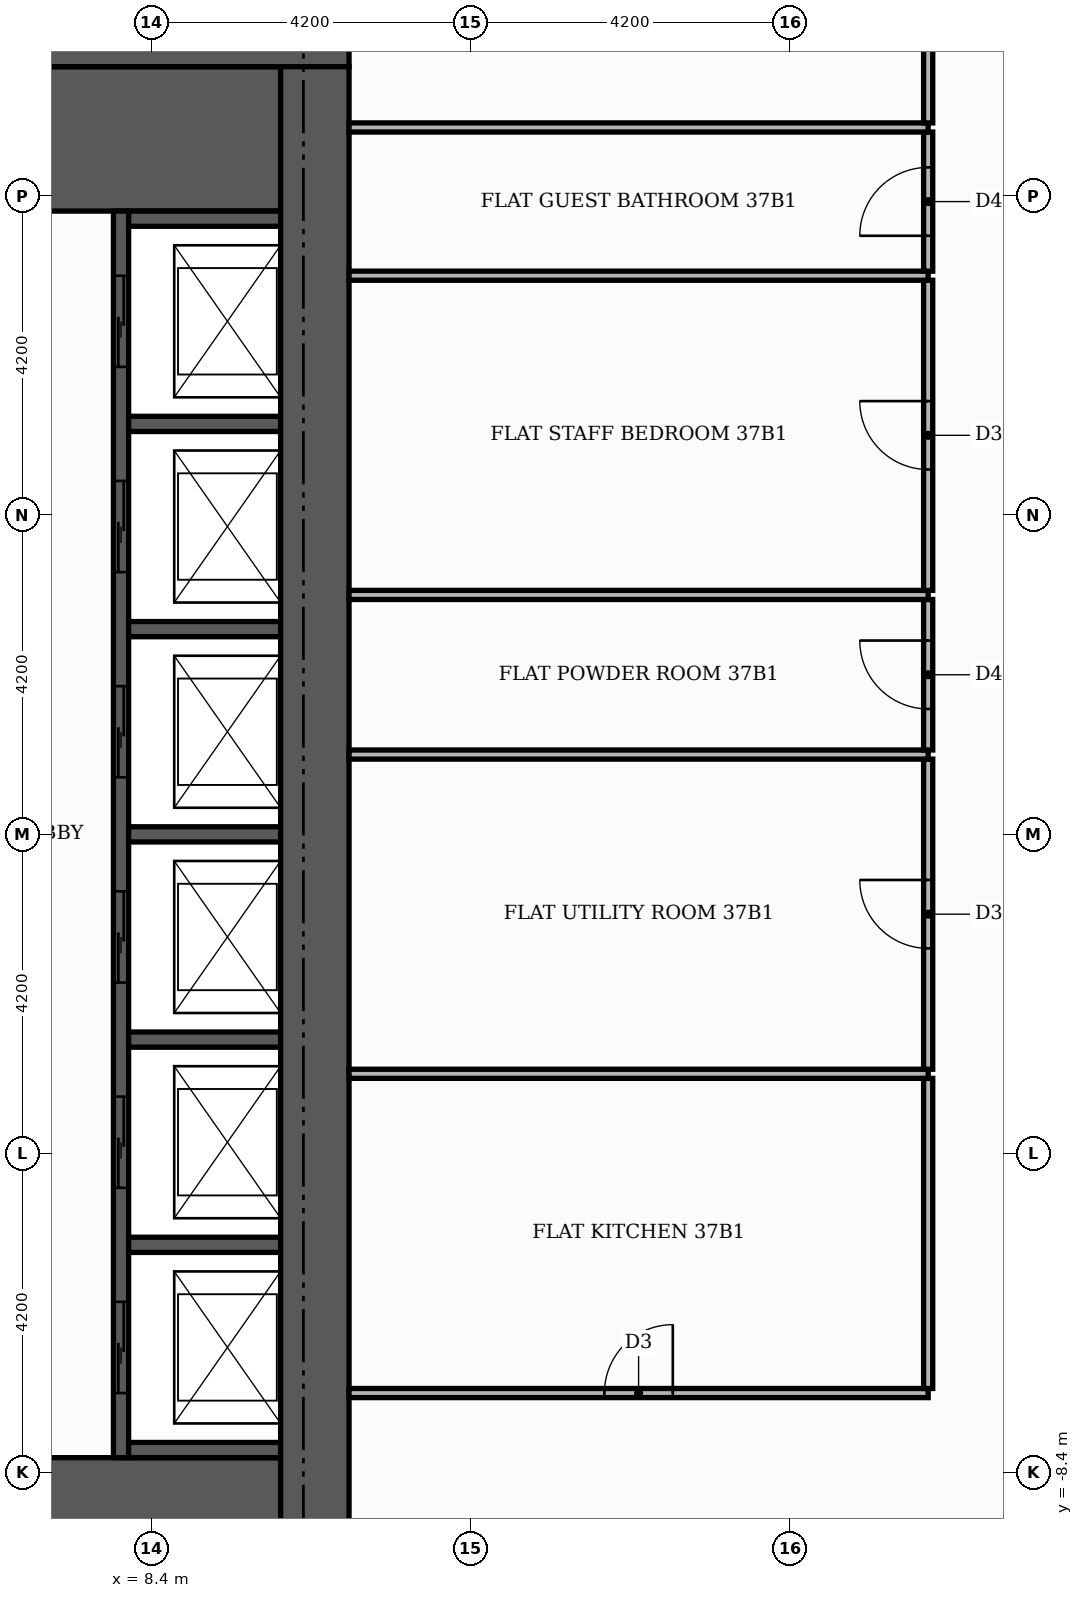
"""IFC4 building model, lengths in metres.
Left out: names, types, materials, properties, quantities, classifications, styles, units other than length and angle.
Written with IfcOpenShell. Run it as: python <this file> out.ifc"""

import sys

from ifc_helpers import new_model, si_unit, direction, frame, frame_2d, origin, place, context, subcontext, project, spatial, rectangle, extrude, element, fill, save


model = new_model("IFC4")
c1 = context("Model", 3, precision=1e-05, world=origin(), true_north=direction((0.0, 1.0)))
c2 = subcontext(c1, "Body", "Model", "MODEL_VIEW")
j1 = project(units=[si_unit("LENGTHUNIT", "METRE"), si_unit("PLANEANGLEUNIT", "RADIAN")], contexts=[c1])
p1 = place(None, origin())
s1 = spatial("IfcSite", under=j1, at=p1, CompositionType="ELEMENT")
p2 = place(p1, origin())
s2 = spatial("IfcBuilding", under=s1, at=p2, CompositionType="ELEMENT")
p3 = place(p2, frame((0.0, 0.0, 157.2)))
s3 = spatial("IfcBuildingStorey", under=s2, at=p3, CompositionType="ELEMENT", Elevation=157.2)
for number, where, z_axis, x_axis in (
    (1, (5.5, -9.15, 0.0), (0.0, 0.0, 1.0), (1.0, 0.0, 0.0)),
    (2, (5.5, 9.15, 0.0), (0.0, 0.0, 1.0), (1.0, 0.0, 0.0)),
):
    element("IfcWall", number, at=place(p3, frame(where, z_axis=z_axis, x_axis=x_axis)), inside=s3, PredefinedType="SHEAR", context=c2, shape_type="SweptSolid", body=[
        extrude(rectangle(XDim=4.6, YDim=1.9, at=frame_2d((2.3, 0.0))), origin(), (0.0, 0.0, 1.0), 3.48),
    ])
p4 = place(p3, frame((8.0, -8.2, 0.0), z_axis=(0.0, 0.0, 1.0), x_axis=(0.0, 1.0, 0.0)))
e3 = element("IfcWall", 3, at=p4, inside=s3, PredefinedType="SHEAR", context=c2, shape_type="SweptSolid", body=[
    extrude(rectangle(XDim=16.4, YDim=0.2, at=frame_2d((8.2, 0.0))), origin(), (0.0, 0.0, 1.0), 3.48),
])
p5 = place(p4, frame((0.85, 0.0, 0.0)))
e4 = element("IfcOpeningElement", 4, at=p5, cuts=e3, PredefinedType="OPENING", context=c2, shape_type="SweptSolid", body=[
    extrude(rectangle(XDim=1.2, YDim=2.1, at=frame_2d((0.6, 1.05))), frame((0.0, 0.11, 0.0), z_axis=(0.0, -1.0, 0.0), x_axis=(1.0, 0.0, 0.0)), (0.0, 0.0, 1.0), 0.22),
])
p6 = place(p4, frame((3.55, 0.0, 0.0)))
e5 = element("IfcOpeningElement", 5, at=p6, cuts=e3, PredefinedType="OPENING", context=c2, shape_type="SweptSolid", body=[
    extrude(rectangle(XDim=1.2, YDim=2.1, at=frame_2d((0.6, 1.05))), frame((0.0, 0.11, 0.0), z_axis=(0.0, -1.0, 0.0), x_axis=(1.0, 0.0, 0.0)), (0.0, 0.0, 1.0), 0.22),
])
p7 = place(p4, frame((6.25, 0.0, 0.0)))
e6 = element("IfcOpeningElement", 6, at=p7, cuts=e3, PredefinedType="OPENING", context=c2, shape_type="SweptSolid", body=[
    extrude(rectangle(XDim=1.2, YDim=2.1, at=frame_2d((0.6, 1.05))), frame((0.0, 0.11, 0.0), z_axis=(0.0, -1.0, 0.0), x_axis=(1.0, 0.0, 0.0)), (0.0, 0.0, 1.0), 0.22),
])
p8 = place(p4, frame((8.95, 0.0, 0.0)))
e7 = element("IfcOpeningElement", 7, at=p8, cuts=e3, PredefinedType="OPENING", context=c2, shape_type="SweptSolid", body=[
    extrude(rectangle(XDim=1.2, YDim=2.1, at=frame_2d((0.6, 1.05))), frame((0.0, 0.11, 0.0), z_axis=(0.0, -1.0, 0.0), x_axis=(1.0, 0.0, 0.0)), (0.0, 0.0, 1.0), 0.22),
])
p9 = place(p4, frame((11.65, 0.0, 0.0)))
e8 = element("IfcOpeningElement", 8, at=p9, cuts=e3, PredefinedType="OPENING", context=c2, shape_type="SweptSolid", body=[
    extrude(rectangle(XDim=1.2, YDim=2.1, at=frame_2d((0.6, 1.05))), frame((0.0, 0.11, 0.0), z_axis=(0.0, -1.0, 0.0), x_axis=(1.0, 0.0, 0.0)), (0.0, 0.0, 1.0), 0.22),
])
p10 = place(p4, frame((14.35, 0.0, 0.0)))
e9 = element("IfcOpeningElement", 9, at=p10, cuts=e3, PredefinedType="OPENING", context=c2, shape_type="SweptSolid", body=[
    extrude(rectangle(XDim=1.2, YDim=2.1, at=frame_2d((0.6, 1.05))), frame((0.0, 0.11, 0.0), z_axis=(0.0, -1.0, 0.0), x_axis=(1.0, 0.0, 0.0)), (0.0, 0.0, 1.0), 0.22),
])
for number, where, z_axis, x_axis in (
    (10, (8.1, -8.1, 0.0), (0.0, 0.0, 1.0), (1.0, 0.0, 0.0)),
    (11, (8.1, -5.4, 0.0), (0.0, 0.0, 1.0), (1.0, 0.0, 0.0)),
    (12, (8.1, -2.7, 0.0), (0.0, 0.0, 1.0), (1.0, 0.0, 0.0)),
    (13, (8.1, 0.0, 0.0), (0.0, 0.0, 1.0), (1.0, 0.0, 0.0)),
    (14, (8.1, 2.7, 0.0), (0.0, 0.0, 1.0), (1.0, 0.0, 0.0)),
    (15, (8.1, 5.4, 0.0), (0.0, 0.0, 1.0), (1.0, 0.0, 0.0)),
    (16, (8.1, 8.1, 0.0), (0.0, 0.0, 1.0), (1.0, 0.0, 0.0)),
):
    element("IfcWall", number, at=place(p3, frame(where, z_axis=z_axis, x_axis=x_axis)), inside=s3, PredefinedType="SHEAR", context=c2, shape_type="SweptSolid", body=[
        extrude(rectangle(XDim=2.0, YDim=0.2, at=frame_2d((1.0, 0.0))), origin(), (0.0, 0.0, 1.0), 3.48),
    ])
p11 = place(p3, frame((-11.0, 10.55, 0.0), z_axis=(0.0, 0.0, 1.0), x_axis=(1.0, 0.0, 0.0)))
e17 = element("IfcWall", 17, at=p11, inside=s3, PredefinedType="SHEAR", context=c2, shape_type="SweptSolid", body=[
    extrude(rectangle(XDim=22.0, YDim=0.9, at=frame_2d((11.0, 0.0))), origin(), (0.0, 0.0, 1.0), 3.48),
])
p12 = place(p11, frame((13.3, 0.0, 0.0)))
e18 = element("IfcOpeningElement", 18, at=p12, cuts=e17, PredefinedType="OPENING", context=c2, shape_type="SweptSolid", body=[
    extrude(rectangle(XDim=1.8, YDim=2.2, at=frame_2d((0.9, 1.1))), frame((0.0, 0.46, 0.0), z_axis=(0.0, -1.0, 0.0), x_axis=(1.0, 0.0, 0.0)), (0.0, 0.0, 1.0), 0.92),
])
p13 = place(p3, frame((10.55, -10.1, 0.0), z_axis=(0.0, 0.0, 1.0), x_axis=(0.0, 1.0, 0.0)))
e19 = element("IfcWall", 19, at=p13, inside=s3, PredefinedType="SHEAR", context=c2, shape_type="SweptSolid", body=[
    extrude(rectangle(XDim=20.2, YDim=0.9, at=frame_2d((10.1, 0.0))), origin(), (0.0, 0.0, 1.0), 3.48),
])
p14 = place(p3, frame((11.0, -7.35, 0.0), z_axis=(0.0, 0.0, 1.0), x_axis=(1.0, 0.0, 0.0)))
e20 = element("IfcWall", 20, at=p14, inside=s3, PredefinedType="PARTITIONING", context=c2, shape_type="SweptSolid", body=[
    extrude(rectangle(XDim=7.62, YDim=0.12, at=frame_2d((3.81, 0.0))), origin(), (0.0, 0.0, 1.0), 3.48),
])
p15 = place(p14, frame((3.36, 0.0, 0.0)))
e21 = element("IfcOpeningElement", 21, at=p15, cuts=e20, PredefinedType="OPENING", context=c2, shape_type="SweptSolid", body=[
    extrude(rectangle(XDim=0.9, YDim=2.1, at=frame_2d((0.45, 1.05))), frame((0.0, 0.07, 0.0), z_axis=(0.0, -1.0, 0.0), x_axis=(1.0, 0.0, 0.0)), (0.0, 0.0, 1.0), 0.14),
])
p16 = place(p3, frame((18.62, -7.29, 0.0), z_axis=(0.0, 0.0, 1.0), x_axis=(0.0, 1.0, 0.0)))
e22 = element("IfcWall", 22, at=p16, inside=s3, PredefinedType="PARTITIONING", context=c2, shape_type="SweptSolid", body=[
    extrude(rectangle(XDim=4.08, YDim=0.12, at=frame_2d((2.04, 0.0))), origin(), (0.0, 0.0, 1.0), 3.48),
])
p17 = place(p3, frame((11.0, -3.15, 0.0), z_axis=(0.0, 0.0, 1.0), x_axis=(1.0, 0.0, 0.0)))
e23 = element("IfcWall", 23, at=p17, inside=s3, PredefinedType="PARTITIONING", context=c2, shape_type="SweptSolid", body=[
    extrude(rectangle(XDim=7.62, YDim=0.12, at=frame_2d((3.81, 0.0))), origin(), (0.0, 0.0, 1.0), 3.48),
])
p18 = place(p3, frame((18.62, -3.09, 0.0), z_axis=(0.0, 0.0, 1.0), x_axis=(0.0, 1.0, 0.0)))
e24 = element("IfcWall", 24, at=p18, inside=s3, PredefinedType="PARTITIONING", context=c2, shape_type="SweptSolid", body=[
    extrude(rectangle(XDim=4.08, YDim=0.12, at=frame_2d((2.04, 0.0))), origin(), (0.0, 0.0, 1.0), 3.48),
])
p19 = place(p18, frame((1.59, 0.0, 0.0)))
e25 = element("IfcOpeningElement", 25, at=p19, cuts=e24, PredefinedType="OPENING", context=c2, shape_type="SweptSolid", body=[
    extrude(rectangle(XDim=0.9, YDim=2.1, at=frame_2d((0.45, 1.05))), frame((0.0, 0.07, 0.0), z_axis=(0.0, -1.0, 0.0), x_axis=(1.0, 0.0, 0.0)), (0.0, 0.0, 1.0), 0.14),
])
p20 = place(p3, frame((11.0, 1.05, 0.0), z_axis=(0.0, 0.0, 1.0), x_axis=(1.0, 0.0, 0.0)))
e26 = element("IfcWall", 26, at=p20, inside=s3, PredefinedType="PARTITIONING", context=c2, shape_type="SweptSolid", body=[
    extrude(rectangle(XDim=7.62, YDim=0.12, at=frame_2d((3.81, 0.0))), origin(), (0.0, 0.0, 1.0), 3.48),
])
p21 = place(p3, frame((18.62, 1.11, 0.0), z_axis=(0.0, 0.0, 1.0), x_axis=(0.0, 1.0, 0.0)))
e27 = element("IfcWall", 27, at=p21, inside=s3, PredefinedType="PARTITIONING", context=c2, shape_type="SweptSolid", body=[
    extrude(rectangle(XDim=1.98, YDim=0.12, at=frame_2d((0.99, 0.0))), origin(), (0.0, 0.0, 1.0), 3.48),
])
p22 = place(p21, frame((0.54, 0.0, 0.0)))
e28 = element("IfcOpeningElement", 28, at=p22, cuts=e27, PredefinedType="OPENING", context=c2, shape_type="SweptSolid", body=[
    extrude(rectangle(XDim=0.9, YDim=2.1, at=frame_2d((0.45, 1.05))), frame((0.0, 0.07, 0.0), z_axis=(0.0, -1.0, 0.0), x_axis=(1.0, 0.0, 0.0)), (0.0, 0.0, 1.0), 0.14),
])
p23 = place(p3, frame((11.0, 3.15, 0.0), z_axis=(0.0, 0.0, 1.0), x_axis=(1.0, 0.0, 0.0)))
e29 = element("IfcWall", 29, at=p23, inside=s3, PredefinedType="PARTITIONING", context=c2, shape_type="SweptSolid", body=[
    extrude(rectangle(XDim=7.62, YDim=0.12, at=frame_2d((3.81, 0.0))), origin(), (0.0, 0.0, 1.0), 3.48),
])
p24 = place(p3, frame((18.62, 3.21, 0.0), z_axis=(0.0, 0.0, 1.0), x_axis=(0.0, 1.0, 0.0)))
e30 = element("IfcWall", 30, at=p24, inside=s3, PredefinedType="PARTITIONING", context=c2, shape_type="SweptSolid", body=[
    extrude(rectangle(XDim=4.08, YDim=0.12, at=frame_2d((2.04, 0.0))), origin(), (0.0, 0.0, 1.0), 3.48),
])
p25 = place(p24, frame((1.59, 0.0, 0.0)))
e31 = element("IfcOpeningElement", 31, at=p25, cuts=e30, PredefinedType="OPENING", context=c2, shape_type="SweptSolid", body=[
    extrude(rectangle(XDim=0.9, YDim=2.1, at=frame_2d((0.45, 1.05))), frame((0.0, 0.07, 0.0), z_axis=(0.0, -1.0, 0.0), x_axis=(1.0, 0.0, 0.0)), (0.0, 0.0, 1.0), 0.14),
])
p26 = place(p3, frame((11.0, 7.35, 0.0), z_axis=(0.0, 0.0, 1.0), x_axis=(1.0, 0.0, 0.0)))
e32 = element("IfcWall", 32, at=p26, inside=s3, PredefinedType="PARTITIONING", context=c2, shape_type="SweptSolid", body=[
    extrude(rectangle(XDim=7.62, YDim=0.12, at=frame_2d((3.81, 0.0))), origin(), (0.0, 0.0, 1.0), 3.48),
])
p27 = place(p3, frame((18.62, 7.41, 0.0), z_axis=(0.0, 0.0, 1.0), x_axis=(0.0, 1.0, 0.0)))
e33 = element("IfcWall", 33, at=p27, inside=s3, PredefinedType="PARTITIONING", context=c2, shape_type="SweptSolid", body=[
    extrude(rectangle(XDim=1.83, YDim=0.12, at=frame_2d((0.915, 0.0))), origin(), (0.0, 0.0, 1.0), 3.48),
])
p28 = place(p27, frame((0.465, 0.0, 0.0)))
e34 = element("IfcOpeningElement", 34, at=p28, cuts=e33, PredefinedType="OPENING", context=c2, shape_type="SweptSolid", body=[
    extrude(rectangle(XDim=0.9, YDim=2.1, at=frame_2d((0.45, 1.05))), frame((0.0, 0.07, 0.0), z_axis=(0.0, -1.0, 0.0), x_axis=(1.0, 0.0, 0.0)), (0.0, 0.0, 1.0), 0.14),
])
p29 = place(p3, frame((11.0, 9.3, 0.0), z_axis=(0.0, 0.0, 1.0), x_axis=(1.0, 0.0, 0.0)))
e35 = element("IfcWall", 35, at=p29, inside=s3, PredefinedType="PARTITIONING", context=c2, shape_type="SweptSolid", body=[
    extrude(rectangle(XDim=7.62, YDim=0.12, at=frame_2d((3.81, 0.0))), origin(), (0.0, 0.0, 1.0), 3.48),
])
p30 = place(p3, frame((18.62, 9.36, 0.0), z_axis=(0.0, 0.0, 1.0), x_axis=(0.0, 1.0, 0.0)))
e36 = element("IfcWall", 36, at=p30, inside=s3, PredefinedType="PARTITIONING", context=c2, shape_type="SweptSolid", body=[
    extrude(rectangle(XDim=4.19, YDim=0.12, at=frame_2d((2.095, 0.0))), origin(), (0.0, 0.0, 1.0), 3.48),
])
p31 = place(p30, frame((1.665, 0.0, 0.0)))
e37 = element("IfcOpeningElement", 37, at=p31, cuts=e36, PredefinedType="OPENING", context=c2, shape_type="SweptSolid", body=[
    extrude(rectangle(XDim=0.9, YDim=2.1, at=frame_2d((0.45, 1.05))), frame((0.0, 0.07, 0.0), z_axis=(0.0, -1.0, 0.0), x_axis=(1.0, 0.0, 0.0)), (0.0, 0.0, 1.0), 0.14),
])
p32 = place(p5, origin())
e38 = element("IfcDoor", 38, at=p32, inside=s3, OperationType="SLIDING_TO_LEFT", PredefinedType="DOOR", context=c2, shape_type="SweptSolid", body=[
    extrude(rectangle(XDim=1.2, YDim=2.1, at=frame_2d((0.6, 1.05))), frame((0.0, 0.025, 0.0), z_axis=(0.0, -1.0, 0.0), x_axis=(1.0, 0.0, 0.0)), (0.0, 0.0, 1.0), 0.05),
])
fill(e4, e38)
p33 = place(p6, origin())
e39 = element("IfcDoor", 39, at=p33, inside=s3, OperationType="SLIDING_TO_LEFT", PredefinedType="DOOR", context=c2, shape_type="SweptSolid", body=[
    extrude(rectangle(XDim=1.2, YDim=2.1, at=frame_2d((0.6, 1.05))), frame((0.0, 0.025, 0.0), z_axis=(0.0, -1.0, 0.0), x_axis=(1.0, 0.0, 0.0)), (0.0, 0.0, 1.0), 0.05),
])
fill(e5, e39)
p34 = place(p7, origin())
e40 = element("IfcDoor", 40, at=p34, inside=s3, OperationType="SLIDING_TO_LEFT", PredefinedType="DOOR", context=c2, shape_type="SweptSolid", body=[
    extrude(rectangle(XDim=1.2, YDim=2.1, at=frame_2d((0.6, 1.05))), frame((0.0, 0.025, 0.0), z_axis=(0.0, -1.0, 0.0), x_axis=(1.0, 0.0, 0.0)), (0.0, 0.0, 1.0), 0.05),
])
fill(e6, e40)
p35 = place(p8, origin())
e41 = element("IfcDoor", 41, at=p35, inside=s3, OperationType="SLIDING_TO_LEFT", PredefinedType="DOOR", context=c2, shape_type="SweptSolid", body=[
    extrude(rectangle(XDim=1.2, YDim=2.1, at=frame_2d((0.6, 1.05))), frame((0.0, 0.025, 0.0), z_axis=(0.0, -1.0, 0.0), x_axis=(1.0, 0.0, 0.0)), (0.0, 0.0, 1.0), 0.05),
])
fill(e7, e41)
p36 = place(p9, origin())
e42 = element("IfcDoor", 42, at=p36, inside=s3, OperationType="SLIDING_TO_LEFT", PredefinedType="DOOR", context=c2, shape_type="SweptSolid", body=[
    extrude(rectangle(XDim=1.2, YDim=2.1, at=frame_2d((0.6, 1.05))), frame((0.0, 0.025, 0.0), z_axis=(0.0, -1.0, 0.0), x_axis=(1.0, 0.0, 0.0)), (0.0, 0.0, 1.0), 0.05),
])
fill(e8, e42)
p37 = place(p10, origin())
e43 = element("IfcDoor", 43, at=p37, inside=s3, OperationType="SLIDING_TO_LEFT", PredefinedType="DOOR", context=c2, shape_type="SweptSolid", body=[
    extrude(rectangle(XDim=1.2, YDim=2.1, at=frame_2d((0.6, 1.05))), frame((0.0, 0.025, 0.0), z_axis=(0.0, -1.0, 0.0), x_axis=(1.0, 0.0, 0.0)), (0.0, 0.0, 1.0), 0.05),
])
fill(e9, e43)
p38 = place(p15, origin())
e44 = element("IfcDoor", 44, at=p38, inside=s3, OperationType="SINGLE_SWING_RIGHT", PredefinedType="DOOR", context=c2, shape_type="SweptSolid", body=[
    extrude(rectangle(XDim=0.9, YDim=2.1, at=frame_2d((0.45, 1.05))), frame((0.0, 0.025, 0.0), z_axis=(0.0, -1.0, 0.0), x_axis=(1.0, 0.0, 0.0)), (0.0, 0.0, 1.0), 0.05),
])
fill(e21, e44)
p39 = place(p19, origin())
e45 = element("IfcDoor", 45, at=p39, inside=s3, OperationType="SINGLE_SWING_RIGHT", PredefinedType="DOOR", context=c2, shape_type="SweptSolid", body=[
    extrude(rectangle(XDim=0.9, YDim=2.1, at=frame_2d((0.45, 1.05))), frame((0.0, 0.025, 0.0), z_axis=(0.0, -1.0, 0.0), x_axis=(1.0, 0.0, 0.0)), (0.0, 0.0, 1.0), 0.05),
])
fill(e25, e45)
p40 = place(p22, origin())
e46 = element("IfcDoor", 46, at=p40, inside=s3, OperationType="SINGLE_SWING_RIGHT", PredefinedType="DOOR", context=c2, shape_type="SweptSolid", body=[
    extrude(rectangle(XDim=0.9, YDim=2.1, at=frame_2d((0.45, 1.05))), frame((0.0, 0.025, 0.0), z_axis=(0.0, -1.0, 0.0), x_axis=(1.0, 0.0, 0.0)), (0.0, 0.0, 1.0), 0.05),
])
fill(e28, e46)
p41 = place(p25, origin())
e47 = element("IfcDoor", 47, at=p41, inside=s3, OperationType="SINGLE_SWING_RIGHT", PredefinedType="DOOR", context=c2, shape_type="SweptSolid", body=[
    extrude(rectangle(XDim=0.9, YDim=2.1, at=frame_2d((0.45, 1.05))), frame((0.0, 0.025, 0.0), z_axis=(0.0, -1.0, 0.0), x_axis=(1.0, 0.0, 0.0)), (0.0, 0.0, 1.0), 0.05),
])
fill(e31, e47)
p42 = place(p28, origin())
e48 = element("IfcDoor", 48, at=p42, inside=s3, OperationType="SINGLE_SWING_LEFT", PredefinedType="DOOR", context=c2, shape_type="SweptSolid", body=[
    extrude(rectangle(XDim=0.9, YDim=2.1, at=frame_2d((0.45, 1.05))), frame((0.0, 0.025, 0.0), z_axis=(0.0, -1.0, 0.0), x_axis=(1.0, 0.0, 0.0)), (0.0, 0.0, 1.0), 0.05),
])
fill(e34, e48)
save(model, sys.argv[1])
